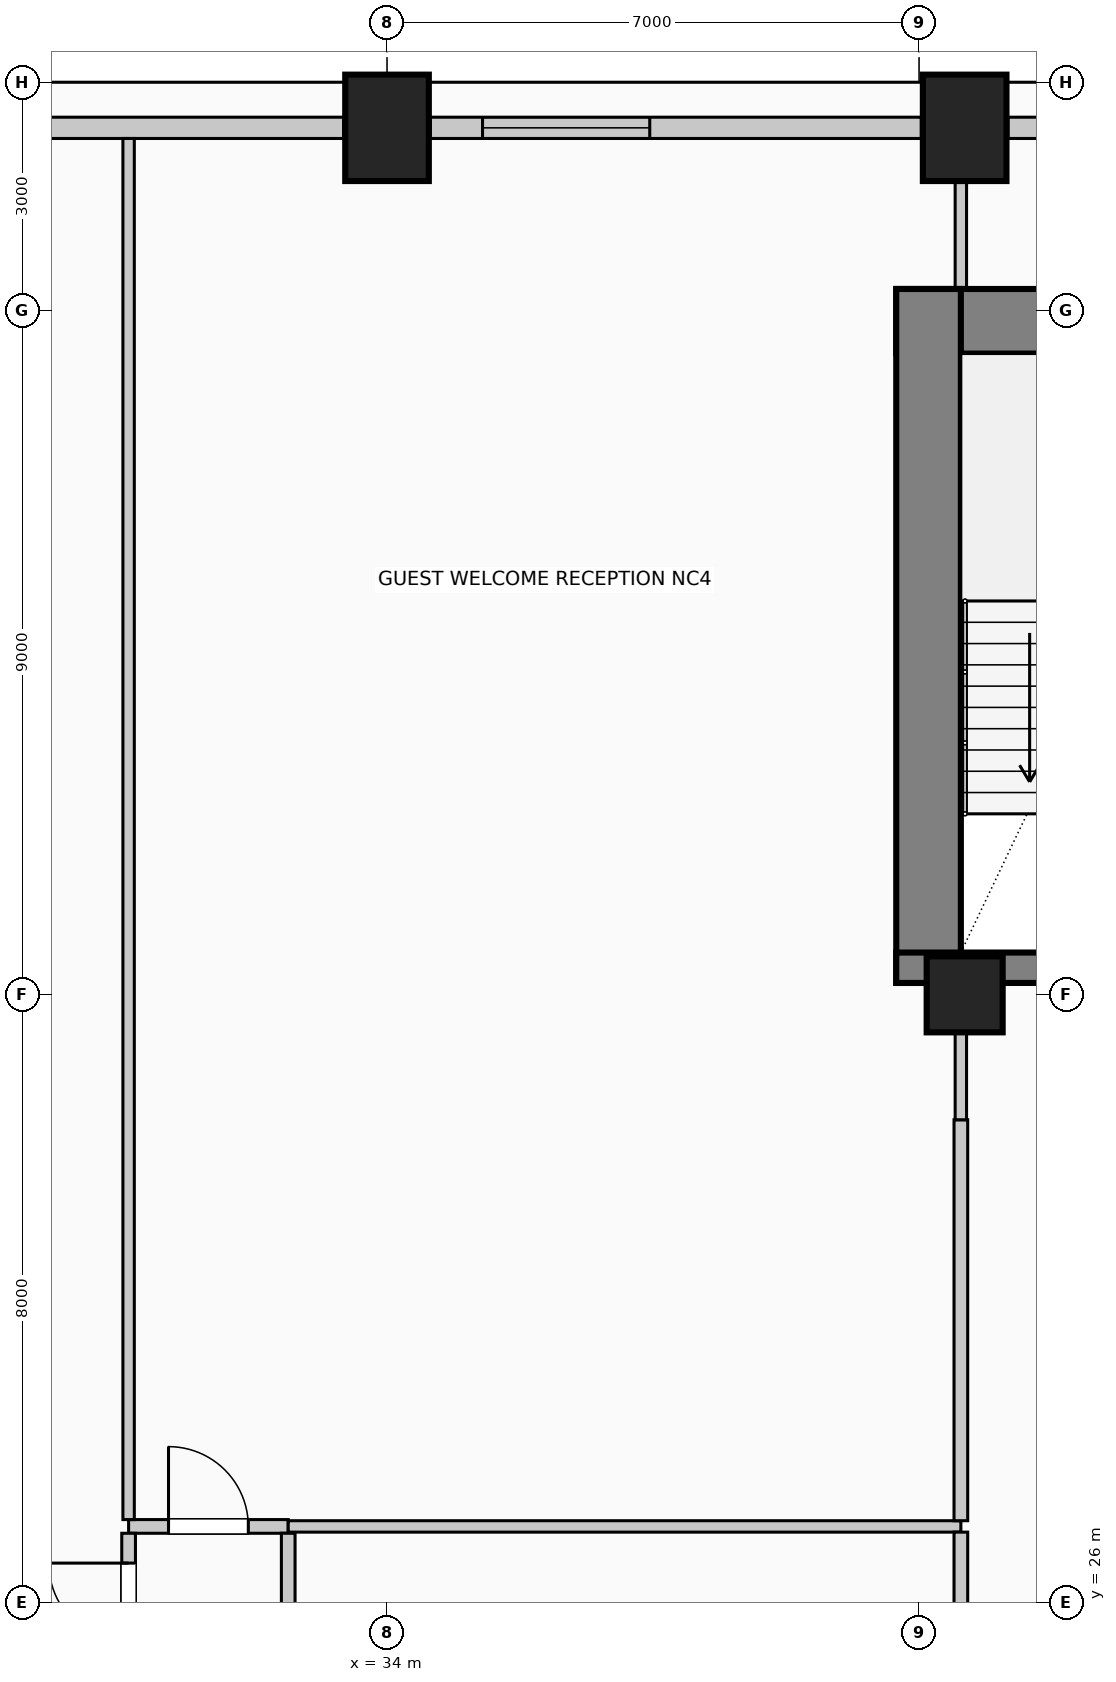
"""IFC4 building model, lengths in metres.
Left out: names, types, materials, properties, quantities, classifications, styles, units other than length and angle.
Written with IfcOpenShell. Run it as: python <this file> out.ifc"""

import sys

from ifc_helpers import new_model, si_unit, direction, frame, frame_2d, origin, origin_2d, place, context, subcontext, project, spatial, rectangle, circle, extrude, element, fill, save


model = new_model("IFC4")
c1 = context("Model", 3, precision=1e-05, world=origin(), true_north=direction((0.0, 1.0)))
c2 = subcontext(c1, "Body", "Model", "MODEL_VIEW")
j1 = project(units=[si_unit("LENGTHUNIT", "METRE"), si_unit("PLANEANGLEUNIT", "RADIAN")], contexts=[c1])
p1 = place(None, origin())
s1 = spatial("IfcSite", under=j1, at=p1, CompositionType="ELEMENT")
p2 = place(p1, origin())
s2 = spatial("IfcBuilding", under=s1, at=p2, CompositionType="ELEMENT")
p3 = place(p2, frame((0.0, 0.0, 92.6)))
s3 = spatial("IfcBuildingStorey", under=s2, at=p3, CompositionType="ELEMENT", Elevation=92.6)
p4 = place(p3, frame((40.7, 42.855, 0.0), z_axis=(0.0, 0.0, 1.0), x_axis=(1.0, 0.0, 0.0)))
e1 = element("IfcWall", 1, at=p4, inside=s3, PredefinedType="SHEAR", context=c2, shape_type="SweptSolid", body=[
    extrude(rectangle(XDim=14.6, YDim=0.85, at=frame_2d((7.3, 0.0))), origin(), (0.0, 0.0, 1.0), 4.0),
])
p5 = place(p3, frame((41.125, 34.15, 0.0), z_axis=(0.0, 0.0, 1.0), x_axis=(0.0, 1.0, 0.0)))
e2 = element("IfcWall", 2, at=p5, inside=s3, PredefinedType="SHEAR", context=c2, shape_type="SweptSolid", body=[
    extrude(rectangle(XDim=9.13, YDim=0.85, at=frame_2d((4.565, 0.0))), origin(), (0.0, 0.0, 1.0), 4.0),
])
p6 = place(p3, frame((40.7, 34.35, 0.0), z_axis=(0.0, 0.0, 1.0), x_axis=(1.0, 0.0, 0.0)))
e3 = element("IfcWall", 3, at=p6, inside=s3, PredefinedType="SHEAR", context=c2, shape_type="SweptSolid", body=[
    extrude(rectangle(XDim=5.01, YDim=0.4, at=frame_2d((2.505, 0.0))), origin(), (0.0, 0.0, 1.0), 4.0),
])
p7 = place(p6, frame((2.4, 0.0, 0.0)))
e4 = element("IfcOpeningElement", 4, at=p7, cuts=e3, PredefinedType="OPENING", context=c2, shape_type="SweptSolid", body=[
    extrude(rectangle(XDim=1.15, YDim=2.2, at=frame_2d((0.575, 1.1))), frame((0.0, 0.21, 0.0), z_axis=(0.0, -1.0, 0.0), x_axis=(1.0, 0.0, 0.0)), (0.0, 0.0, 1.0), 0.42),
])
for number, where, z_axis, x_axis in (
    (5, (34.0, 45.4, 0.0), (0.0, 0.0, 1.0), (1.0, 0.0, 0.0)),
    (6, (41.6, 45.4, 0.0), (0.0, 0.0, 1.0), (1.0, 0.0, 0.0)),
):
    element("IfcColumn", number, at=place(p3, frame(where, z_axis=z_axis, x_axis=x_axis)), inside=s3, PredefinedType="COLUMN", context=c2, shape_type="SweptSolid", body=[
        extrude(rectangle(XDim=1.1, YDim=1.4, at=origin_2d()), origin(), (0.0, 0.0, 1.0), 4.0),
    ])
p8 = place(p3, frame((41.6, 34.0, 0.0), z_axis=(0.0, 0.0, 1.0), x_axis=(1.0, 0.0, 0.0)))
e7 = element("IfcColumn", 7, at=p8, inside=s3, PredefinedType="COLUMN", context=c2, shape_type="SweptSolid", body=[
    extrude(circle(Radius=0.5, at=origin_2d()), origin(), (0.0, 0.0, 1.0), 4.0),
])
p9 = place(p3, frame((29.445, 45.4, 0.0), z_axis=(0.0, 0.0, 1.0), x_axis=(1.0, 0.0, 0.0)))
e8 = element("IfcWall", 8, at=p9, inside=s3, PredefinedType="SOLIDWALL", context=c2, shape_type="SweptSolid", body=[
    extrude(rectangle(XDim=3.985, YDim=0.28, at=frame_2d((1.992, 0.0))), origin(), (0.0, 0.0, 1.0), 2.875),
])
p10 = place(p3, frame((34.57, 45.4, 0.0), z_axis=(0.0, 0.0, 1.0), x_axis=(1.0, 0.0, 0.0)))
e9 = element("IfcWall", 9, at=p10, inside=s3, PredefinedType="SOLIDWALL", context=c2, shape_type="SweptSolid", body=[
    extrude(rectangle(XDim=6.46, YDim=0.28, at=frame_2d((3.23, 0.0))), origin(), (0.0, 0.0, 1.0), 2.875),
])
p11 = place(p10, frame((0.687, 0.0, 0.5)))
e10 = element("IfcOpeningElement", 10, at=p11, cuts=e9, PredefinedType="OPENING", context=c2, shape_type="SweptSolid", body=[
    extrude(rectangle(XDim=2.2, YDim=1.95, at=frame_2d((1.1, 0.975))), frame((0.0, 0.15, 0.0), z_axis=(0.0, -1.0, 0.0), x_axis=(1.0, 0.0, 0.0)), (0.0, 0.0, 1.0), 0.3),
])
p12 = place(p3, frame((42.17, 45.4, 0.0), z_axis=(0.0, 0.0, 1.0), x_axis=(1.0, 0.0, 0.0)))
e11 = element("IfcWall", 11, at=p12, inside=s3, PredefinedType="SOLIDWALL", context=c2, shape_type="SweptSolid", body=[
    extrude(rectangle(XDim=1.385, YDim=0.28, at=frame_2d((0.692, 0.0))), origin(), (0.0, 0.0, 1.0), 2.875),
])
p13 = place(p3, frame((30.6, 27.0, 0.0), z_axis=(0.0, 0.0, 1.0), x_axis=(1.0, 0.0, 0.0)))
e12 = element("IfcWall", 12, at=p13, inside=s3, PredefinedType="PARTITIONING", context=c2, shape_type="SweptSolid", body=[
    extrude(rectangle(XDim=2.1, YDim=0.18, at=frame_2d((1.05, 0.0))), origin(), (0.0, 0.0, 1.0), 3.725),
])
p14 = place(p13, frame((0.525, 0.0, 0.0)))
e13 = element("IfcOpeningElement", 13, at=p14, cuts=e12, PredefinedType="OPENING", context=c2, shape_type="SweptSolid", body=[
    extrude(rectangle(XDim=1.05, YDim=2.15, at=frame_2d((0.525, 1.075))), frame((0.0, 0.1, 0.0), z_axis=(0.0, -1.0, 0.0), x_axis=(1.0, 0.0, 0.0)), (0.0, 0.0, 1.0), 0.2),
])
p15 = place(p3, frame((32.7, 27.0, 0.0), z_axis=(0.0, 0.0, 1.0), x_axis=(1.0, 0.0, 0.0)))
e14 = element("IfcWall", 14, at=p15, inside=s3, PredefinedType="PARTITIONING", context=c2, shape_type="SweptSolid", body=[
    extrude(rectangle(XDim=8.85, YDim=0.15, at=frame_2d((4.425, 0.0))), origin(), (0.0, 0.0, 1.0), 3.725),
])
p16 = place(p3, frame((30.6, 25.075, 0.0), z_axis=(0.0, 0.0, 1.0), x_axis=(0.0, 1.0, 0.0)))
e15 = element("IfcWall", 15, at=p16, inside=s3, PredefinedType="PARTITIONING", context=c2, shape_type="SweptSolid", body=[
    extrude(rectangle(XDim=1.835, YDim=0.18, at=frame_2d((0.917, 0.0))), origin(), (0.0, 0.0, 1.0), 3.725),
])
p17 = place(p16, frame((0.393, 0.0, 0.0)))
e16 = element("IfcOpeningElement", 16, at=p17, cuts=e15, PredefinedType="OPENING", context=c2, shape_type="SweptSolid", body=[
    extrude(rectangle(XDim=1.05, YDim=2.15, at=frame_2d((0.525, 1.075))), frame((0.0, 0.1, 0.0), z_axis=(0.0, -1.0, 0.0), x_axis=(1.0, 0.0, 0.0)), (0.0, 0.0, 1.0), 0.2),
])
p18 = place(p3, frame((30.6, 27.09, 0.0), z_axis=(0.0, 0.0, 1.0), x_axis=(0.0, 1.0, 0.0)))
e17 = element("IfcWall", 17, at=p18, inside=s3, PredefinedType="PARTITIONING", context=c2, shape_type="SweptSolid", body=[
    extrude(rectangle(XDim=18.17, YDim=0.15, at=frame_2d((9.085, 0.0))), origin(), (0.0, 0.0, 1.0), 3.725),
])
p19 = place(p3, frame((32.7, 15.74, 0.0), z_axis=(0.0, 0.0, 1.0), x_axis=(0.0, 1.0, 0.0)))
e18 = element("IfcWall", 18, at=p19, inside=s3, PredefinedType="PARTITIONING", context=c2, shape_type="SweptSolid", body=[
    extrude(rectangle(XDim=11.17, YDim=0.18, at=frame_2d((5.585, 0.0))), origin(), (0.0, 0.0, 1.0), 3.725),
])
p20 = place(p3, frame((41.55, 18.5, 0.0), z_axis=(0.0, 0.0, 1.0), x_axis=(0.0, 1.0, 0.0)))
e19 = element("IfcWall", 19, at=p20, inside=s3, PredefinedType="PARTITIONING", context=c2, shape_type="SweptSolid", body=[
    extrude(rectangle(XDim=8.425, YDim=0.18, at=frame_2d((4.212, 0.0))), origin(), (0.0, 0.0, 1.0), 3.07),
])
p21 = place(p3, frame((41.55, 27.075, 0.0), z_axis=(0.0, 0.0, 1.0), x_axis=(0.0, 1.0, 0.0)))
e20 = element("IfcWall", 20, at=p21, inside=s3, PredefinedType="PARTITIONING", context=c2, shape_type="SweptSolid", body=[
    extrude(rectangle(XDim=5.275, YDim=0.18, at=frame_2d((2.638, 0.0))), origin(), (0.0, 0.0, 1.0), 3.07),
])
p22 = place(p3, frame((41.55, 32.35, 0.0), z_axis=(0.0, 0.0, 1.0), x_axis=(0.0, 1.0, 0.0)))
e21 = element("IfcWall", 21, at=p22, inside=s3, PredefinedType="PARTITIONING", context=c2, shape_type="SweptSolid", body=[
    extrude(rectangle(XDim=1.15, YDim=0.15, at=frame_2d((0.575, 0.0))), origin(), (0.0, 0.0, 1.0), 3.07),
])
p23 = place(p3, frame((41.55, 43.28, 0.0), z_axis=(0.0, 0.0, 1.0), x_axis=(0.0, 1.0, 0.0)))
e22 = element("IfcWall", 22, at=p23, inside=s3, PredefinedType="PARTITIONING", context=c2, shape_type="SweptSolid", body=[
    extrude(rectangle(XDim=1.42, YDim=0.15, at=frame_2d((0.71, 0.0))), origin(), (0.0, 0.0, 1.0), 3.725),
])
p24 = place(p11, origin())
e23 = element("IfcWindow", 23, at=p24, inside=s3, PartitioningType="SINGLE_PANEL", PredefinedType="WINDOW", context=c2, shape_type="SweptSolid", body=[
    extrude(rectangle(XDim=2.2, YDim=1.95, at=frame_2d((1.1, 0.975))), frame((0.0, 0.03, 0.0), z_axis=(0.0, -1.0, 0.0), x_axis=(1.0, 0.0, 0.0)), (0.0, 0.0, 1.0), 0.06),
])
fill(e10, e23)
p25 = place(p14, origin())
e24 = element("IfcDoor", 24, at=p25, inside=s3, OperationType="SINGLE_SWING_LEFT", PredefinedType="DOOR", context=c2, shape_type="SweptSolid", body=[
    extrude(rectangle(XDim=1.05, YDim=2.15, at=frame_2d((0.525, 1.075))), frame((0.0, 0.025, 0.0), z_axis=(0.0, -1.0, 0.0), x_axis=(1.0, 0.0, 0.0)), (0.0, 0.0, 1.0), 0.05),
])
fill(e13, e24)
p26 = place(p17, origin())
e25 = element("IfcDoor", 25, at=p26, inside=s3, OperationType="SINGLE_SWING_RIGHT", PredefinedType="DOOR", context=c2, shape_type="SweptSolid", body=[
    extrude(rectangle(XDim=1.05, YDim=2.15, at=frame_2d((0.525, 1.075))), frame((0.0, 0.025, 0.0), z_axis=(0.0, -1.0, 0.0), x_axis=(1.0, 0.0, 0.0)), (0.0, 0.0, 1.0), 0.05),
])
fill(e16, e25)
save(model, sys.argv[1])
